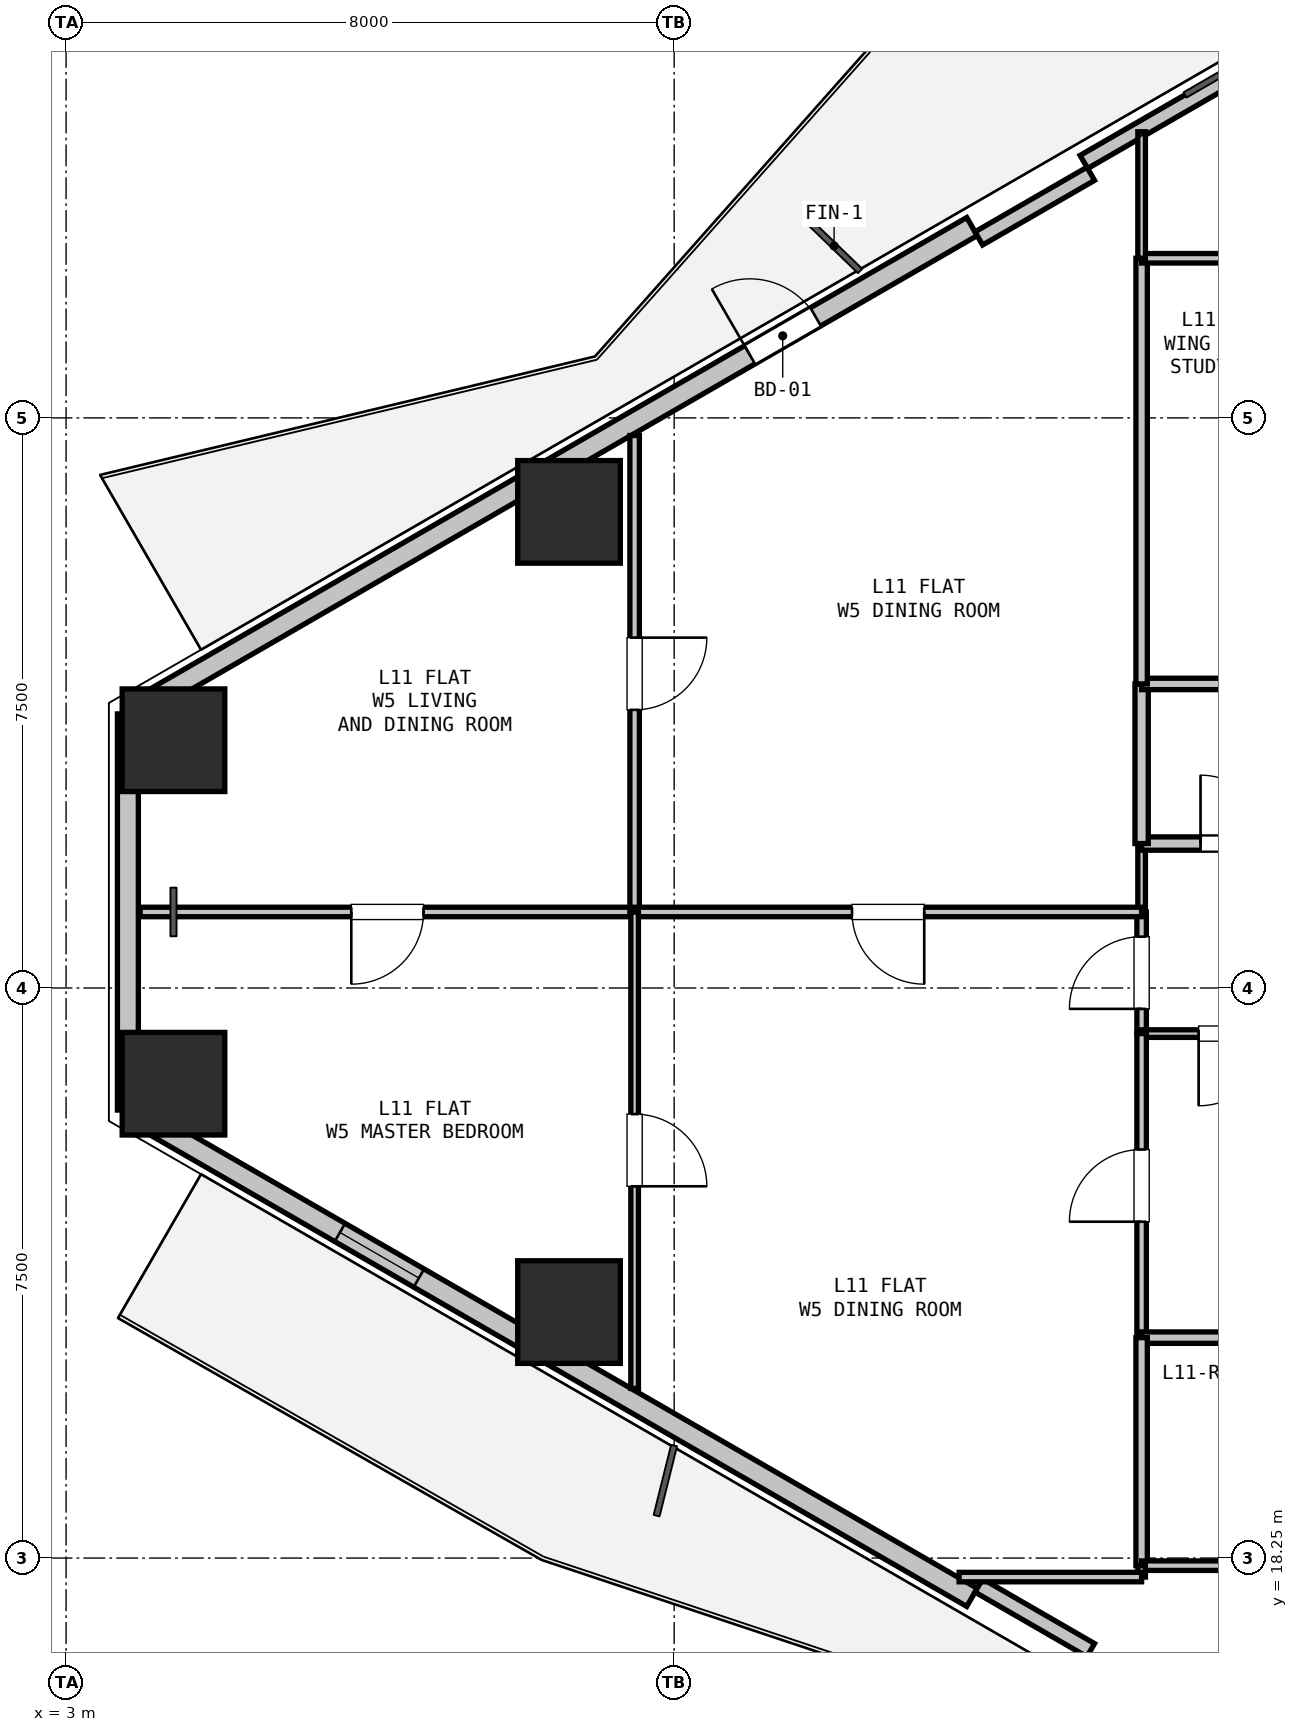
"""IFC4 building model, lengths in metres.
Left out: names, types, materials, properties, quantities, classifications, styles, units other than length and angle.
Written with IfcOpenShell. Run it as: python <this file> out.ifc"""

import sys

from ifc_helpers import new_model, si_unit, direction, frame, frame_2d, origin, origin_2d, place, context, subcontext, project, spatial, rectangle, hollow_rectangle, extrude, element, fill, save


model = new_model("IFC4")
c1 = context("Model", 3, precision=1e-05, world=origin(), true_north=direction((0.0, 1.0)))
c2 = subcontext(c1, "Body", "Model", "MODEL_VIEW")
j1 = project(units=[si_unit("LENGTHUNIT", "METRE"), si_unit("PLANEANGLEUNIT", "RADIAN")], contexts=[c1])
p1 = place(None, origin())
s1 = spatial("IfcSite", under=j1, at=p1, CompositionType="ELEMENT")
p2 = place(p1, origin())
s2 = spatial("IfcBuilding", under=s1, at=p2, CompositionType="ELEMENT")
p3 = place(p2, frame((0.0, 0.0, 42.3)))
s3 = spatial("IfcBuildingStorey", under=s2, at=p3, CompositionType="ELEMENT", Elevation=42.3)
for number, where, z_axis, x_axis in (
    (1, (4.413, 29.009, 0.0), (0.0, 0.0, 1.0), (1.0, 0.0, 0.0)),
    (2, (9.617, 32.014, 0.0), (0.0, 0.0, 1.0), (1.0, 0.0, 0.0)),
    (3, (9.617, 21.486, 0.0), (0.0, 0.0, 1.0), (1.0, 0.0, 0.0)),
    (4, (4.413, 24.491, 0.0), (0.0, 0.0, 1.0), (1.0, 0.0, 0.0)),
):
    element("IfcColumn", number, at=place(p3, frame(where, z_axis=z_axis, x_axis=x_axis)), inside=s3, PredefinedType="COLUMN", context=c2, shape_type="SweptSolid", body=[
        extrude(hollow_rectangle(XDim=1.35, YDim=1.35, WallThickness=0.036, at=origin_2d()), origin(), (0.0, 0.0, 1.0), 3.3),
    ])
p4 = place(p3, frame((3.813, 24.144, 0.0), z_axis=(0.0, 0.0, 1.0), x_axis=(0.0, 1.0, 0.0)))
e5 = element("IfcWall", 5, at=p4, inside=s3, PredefinedType="SOLIDWALL", context=c2, shape_type="SweptSolid", body=[
    extrude(rectangle(XDim=5.211, YDim=0.275, at=frame_2d((2.606, 0.0))), origin(), (0.0, 0.0, 1.0), 2.66),
])
p5 = place(p3, frame((3.943, 29.431, 0.0), z_axis=(0.0, 0.0, 1.0), x_axis=(0.866027105532, 0.499997052475, 0.0)))
e6 = element("IfcWall", 6, at=p5, inside=s3, PredefinedType="SOLIDWALL", context=c2, shape_type="SweptSolid", body=[
    extrude(rectangle(XDim=12.673, YDim=0.275, at=frame_2d((6.336, 0.0))), origin(), (0.0, 0.0, 1.0), 2.66),
])
p6 = place(p5, frame((9.298, 0.0, 0.0)))
e7 = element("IfcOpeningElement", 7, at=p6, cuts=e6, PredefinedType="OPENING", context=c2, shape_type="SweptSolid", body=[
    extrude(rectangle(XDim=1.0, YDim=2.1, at=frame_2d((0.5, 1.05))), frame((0.0, 0.147, 0.0), z_axis=(0.0, -1.0, 0.0), x_axis=(1.0, 0.0, 0.0)), (0.0, 0.0, 1.0), 0.295),
])
p7 = place(p3, frame((16.39, 36.617, 0.0), z_axis=(0.0, 0.0, 1.0), x_axis=(0.866027351828, 0.499996625875, 0.0)))
e8 = element("IfcWall", 8, at=p7, inside=s3, PredefinedType="PARAPET", context=c2, shape_type="SweptSolid", body=[
    extrude(rectangle(XDim=11.973, YDim=0.2, at=frame_2d((5.987, 0.0))), origin(), (0.0, 0.0, 1.0), 0.2),
])
p8 = place(p3, frame((15.008, 35.611, 0.0), z_axis=(0.0, 0.0, 1.0), x_axis=(0.86605165483, 0.499954529098, 0.0)))
e9 = element("IfcWall", 9, at=p8, inside=s3, PredefinedType="PARAPET", context=c2, shape_type="SweptSolid", body=[
    extrude(rectangle(XDim=1.7, YDim=0.2, at=frame_2d((0.85, 0.0))), origin(), (0.0, 0.0, 1.0), 2.66),
])
p9 = place(p3, frame((14.918, 17.733, 0.0), z_axis=(0.0, 0.0, 1.0), x_axis=(-0.866027105532, 0.499997052475, 0.0)))
e10 = element("IfcWall", 10, at=p9, inside=s3, PredefinedType="SOLIDWALL", context=c2, shape_type="SweptSolid", body=[
    extrude(rectangle(XDim=12.673, YDim=0.275, at=frame_2d((6.336, 0.0))), origin(), (0.0, 0.0, 1.0), 2.66),
])
p10 = place(p9, frame((8.402, 0.0, 0.9)))
e11 = element("IfcOpeningElement", 11, at=p10, cuts=e10, PredefinedType="OPENING", context=c2, shape_type="SweptSolid", body=[
    extrude(rectangle(XDim=1.2, YDim=1.4, at=frame_2d((0.6, 0.7))), frame((0.0, 0.147, 0.0), z_axis=(0.0, -1.0, 0.0), x_axis=(1.0, 0.0, 0.0)), (0.0, 0.0, 1.0), 0.295),
])
p11 = place(p3, frame((16.48, 17.039, 0.0), z_axis=(0.0, 0.0, 1.0), x_axis=(-0.86605165483, 0.499954529098, 0.0)))
e12 = element("IfcWall", 12, at=p11, inside=s3, PredefinedType="PARAPET", context=c2, shape_type="SweptSolid", body=[
    extrude(rectangle(XDim=1.7, YDim=0.2, at=frame_2d((0.85, 0.0))), origin(), (0.0, 0.0, 1.0), 2.66),
])
p12 = place(p3, frame((17.15, 25.15, 0.0), z_axis=(0.0, 0.0, 1.0), x_axis=(0.0, 1.0, 0.0)))
e13 = element("IfcWall", 13, at=p12, inside=s3, PredefinedType="PARTITIONING", context=c2, shape_type="SweptSolid", body=[
    extrude(rectangle(XDim=1.6, YDim=0.125, at=frame_2d((0.8, 0.0))), origin(), (0.0, 0.0, 1.0), 3.04),
])
p13 = place(p12, frame((0.325, 0.0, 0.0)))
e14 = element("IfcOpeningElement", 14, at=p13, cuts=e13, PredefinedType="OPENING", context=c2, shape_type="SweptSolid", body=[
    extrude(rectangle(XDim=0.95, YDim=2.1, at=frame_2d((0.475, 1.05))), frame((0.0, 0.073, 0.0), z_axis=(0.0, -1.0, 0.0), x_axis=(1.0, 0.0, 0.0)), (0.0, 0.0, 1.0), 0.145),
])
p14 = place(p3, frame((17.15, 26.75, 0.0), z_axis=(0.0, 0.0, 1.0), x_axis=(0.0, 1.0, 0.0)))
e15 = element("IfcWall", 15, at=p14, inside=s3, PredefinedType="PARTITIONING", context=c2, shape_type="SweptSolid", body=[
    extrude(rectangle(XDim=0.9, YDim=0.1, at=frame_2d((0.45, 0.0))), origin(), (0.0, 0.0, 1.0), 3.04),
])
p15 = place(p3, frame((17.15, 27.65, 0.0), z_axis=(0.0, 0.0, 1.0), x_axis=(1.0, 0.0, 0.0)))
e16 = element("IfcWall", 16, at=p15, inside=s3, PredefinedType="PLUMBINGWALL", context=c2, shape_type="SweptSolid", body=[
    extrude(rectangle(XDim=2.45, YDim=0.175, at=frame_2d((1.225, 0.0))), origin(), (0.0, 0.0, 1.0), 3.04),
])
p16 = place(p15, frame((0.775, 0.0, 0.0)))
e17 = element("IfcOpeningElement", 17, at=p16, cuts=e16, PredefinedType="OPENING", context=c2, shape_type="SweptSolid", body=[
    extrude(rectangle(XDim=0.9, YDim=2.1, at=frame_2d((0.45, 1.05))), frame((0.0, 0.097, 0.0), z_axis=(0.0, -1.0, 0.0), x_axis=(1.0, 0.0, 0.0)), (0.0, 0.0, 1.0), 0.195),
])
p17 = place(p3, frame((19.6, 25.15, 0.0), z_axis=(0.0, 0.0, 1.0), x_axis=(-1.0, 0.0, 0.0)))
e18 = element("IfcWall", 18, at=p17, inside=s3, PredefinedType="PARTITIONING", context=c2, shape_type="SweptSolid", body=[
    extrude(rectangle(XDim=2.45, YDim=0.1, at=frame_2d((1.225, 0.0))), origin(), (0.0, 0.0, 1.0), 3.04),
])
p18 = place(p17, frame((0.75, 0.0, 0.0)))
e19 = element("IfcOpeningElement", 19, at=p18, cuts=e18, PredefinedType="OPENING", context=c2, shape_type="SweptSolid", body=[
    extrude(rectangle(XDim=0.95, YDim=2.1, at=frame_2d((0.475, 1.05))), frame((0.0, 0.06, 0.0), z_axis=(0.0, -1.0, 0.0), x_axis=(1.0, 0.0, 0.0)), (0.0, 0.0, 1.0), 0.12),
])
p19 = place(p3, frame((17.15, 27.65, 0.0), z_axis=(0.0, 0.0, 1.0), x_axis=(0.0, 1.0, 0.0)))
e20 = element("IfcWall", 20, at=p19, inside=s3, PredefinedType="PLUMBINGWALL", context=c2, shape_type="SweptSolid", body=[
    extrude(rectangle(XDim=2.1, YDim=0.175, at=frame_2d((1.05, 0.0))), origin(), (0.0, 0.0, 1.0), 3.04),
])
p20 = place(p3, frame((17.15, 29.75, 0.0), z_axis=(0.0, 0.0, 1.0), x_axis=(1.0, 0.0, 0.0)))
e21 = element("IfcWall", 21, at=p20, inside=s3, PredefinedType="PARTITIONING", context=c2, shape_type="SweptSolid", body=[
    extrude(rectangle(XDim=2.45, YDim=0.15, at=frame_2d((1.225, 0.0))), origin(), (0.0, 0.0, 1.0), 3.04),
])
p21 = place(p3, frame((17.15, 21.15, 0.0), z_axis=(0.0, 0.0, 1.0), x_axis=(0.0, 1.0, 0.0)))
e22 = element("IfcWall", 22, at=p21, inside=s3, PredefinedType="PARTITIONING", context=c2, shape_type="SweptSolid", body=[
    extrude(rectangle(XDim=4.0, YDim=0.125, at=frame_2d((2.0, 0.0))), origin(), (0.0, 0.0, 1.0), 2.337),
])
p22 = place(p21, frame((1.525, 0.0, 0.0)))
e23 = element("IfcOpeningElement", 23, at=p22, cuts=e22, PredefinedType="OPENING", context=c2, shape_type="SweptSolid", body=[
    extrude(rectangle(XDim=0.95, YDim=2.1, at=frame_2d((0.475, 1.05))), frame((0.0, 0.073, 0.0), z_axis=(0.0, -1.0, 0.0), x_axis=(1.0, 0.0, 0.0)), (0.0, 0.0, 1.0), 0.145),
])
p23 = place(p3, frame((19.6, 21.15, 0.0), z_axis=(0.0, 0.0, 1.0), x_axis=(-1.0, 0.0, 0.0)))
e24 = element("IfcWall", 24, at=p23, inside=s3, PredefinedType="PARTITIONING", context=c2, shape_type="SweptSolid", body=[
    extrude(rectangle(XDim=2.45, YDim=0.15, at=frame_2d((1.225, 0.0))), origin(), (0.0, 0.0, 1.0), 2.337),
])
p24 = place(p3, frame((17.15, 29.75, 0.0), z_axis=(0.0, 0.0, 1.0), x_axis=(0.0, 1.0, 0.0)))
e25 = element("IfcWall", 25, at=p24, inside=s3, PredefinedType="PARTITIONING", context=c2, shape_type="SweptSolid", body=[
    extrude(rectangle(XDim=5.6, YDim=0.15, at=frame_2d((2.8, 0.0))), origin(), (0.0, 0.0, 1.0), 2.337),
])
p25 = place(p3, frame((17.15, 35.35, 0.0), z_axis=(0.0, 0.0, 1.0), x_axis=(1.0, 0.0, 0.0)))
e26 = element("IfcWall", 26, at=p25, inside=s3, PredefinedType="PARTITIONING", context=c2, shape_type="SweptSolid", body=[
    extrude(rectangle(XDim=2.45, YDim=0.125, at=frame_2d((1.225, 0.0))), origin(), (0.0, 0.0, 1.0), 3.04),
])
p26 = place(p3, frame((17.15, 18.15, 0.0), z_axis=(0.0, 0.0, 1.0), x_axis=(0.0, 1.0, 0.0)))
e27 = element("IfcWall", 27, at=p26, inside=s3, PredefinedType="PARTITIONING", context=c2, shape_type="SweptSolid", body=[
    extrude(rectangle(XDim=3.0, YDim=0.15, at=frame_2d((1.5, 0.0))), origin(), (0.0, 0.0, 1.0), 3.04),
])
p27 = place(p3, frame((19.6, 18.15, 0.0), z_axis=(0.0, 0.0, 1.0), x_axis=(-1.0, 0.0, 0.0)))
e28 = element("IfcWall", 28, at=p27, inside=s3, PredefinedType="PARTITIONING", context=c2, shape_type="SweptSolid", body=[
    extrude(rectangle(XDim=2.45, YDim=0.125, at=frame_2d((1.225, 0.0))), origin(), (0.0, 0.0, 1.0), 3.04),
])
p28 = place(p3, frame((10.48, 26.75, 0.0), z_axis=(0.0, 0.0, 1.0), x_axis=(-1.0, 0.0, 0.0)))
e29 = element("IfcWall", 29, at=p28, inside=s3, PredefinedType="PARTITIONING", context=c2, shape_type="SweptSolid", body=[
    extrude(rectangle(XDim=6.505, YDim=0.125, at=frame_2d((3.253, 0.0))), origin(), (0.0, 0.0, 1.0), 2.65),
])
p29 = place(p28, frame((2.778, 0.0, 0.0)))
e30 = element("IfcOpeningElement", 30, at=p29, cuts=e29, PredefinedType="OPENING", context=c2, shape_type="SweptSolid", body=[
    extrude(rectangle(XDim=0.95, YDim=2.1, at=frame_2d((0.475, 1.05))), frame((0.0, 0.073, 0.0), z_axis=(0.0, -1.0, 0.0), x_axis=(1.0, 0.0, 0.0)), (0.0, 0.0, 1.0), 0.145),
])
p30 = place(p3, frame((3.813, 29.356, 0.0), z_axis=(0.0, 0.0, 1.0), x_axis=(0.866131372301, 0.499816412211, 0.0)))
e31 = element("IfcWall", 31, at=p30, inside=s3, PredefinedType="PARTITIONING", context=c2, shape_type="SweptSolid", body=[
    extrude(rectangle(XDim=0.15, YDim=0.1, at=frame_2d((0.075, 0.0))), origin(), (0.0, 0.0, 1.0), 3.04),
])
p31 = place(p3, frame((10.48, 33.018, 0.0), z_axis=(0.0, 0.0, 1.0), x_axis=(0.0, -1.0, 0.0)))
e32 = element("IfcWall", 32, at=p31, inside=s3, PredefinedType="PARTITIONING", context=c2, shape_type="SweptSolid", body=[
    extrude(rectangle(XDim=6.268, YDim=0.125, at=frame_2d((3.134, 0.0))), origin(), (0.0, 0.0, 1.0), 2.337),
])
p32 = place(p31, frame((2.659, 0.0, 0.0)))
e33 = element("IfcOpeningElement", 33, at=p32, cuts=e32, PredefinedType="OPENING", context=c2, shape_type="SweptSolid", body=[
    extrude(rectangle(XDim=0.95, YDim=2.1, at=frame_2d((0.475, 1.05))), frame((0.0, 0.073, 0.0), z_axis=(0.0, -1.0, 0.0), x_axis=(1.0, 0.0, 0.0)), (0.0, 0.0, 1.0), 0.145),
])
p33 = place(p3, frame((17.15, 37.014, 0.0), z_axis=(0.0, 0.0, 1.0), x_axis=(0.0, -1.0, 0.0)))
e34 = element("IfcWall", 34, at=p33, inside=s3, PredefinedType="PARTITIONING", context=c2, shape_type="SweptSolid", body=[
    extrude(rectangle(XDim=1.664, YDim=0.1, at=frame_2d((0.832, 0.0))), origin(), (0.0, 0.0, 1.0), 2.365),
])
p34 = place(p3, frame((17.15, 26.75, 0.0), z_axis=(0.0, 0.0, 1.0), x_axis=(-1.0, 0.0, 0.0)))
e35 = element("IfcWall", 35, at=p34, inside=s3, PredefinedType="PARTITIONING", context=c2, shape_type="SweptSolid", body=[
    extrude(rectangle(XDim=6.67, YDim=0.125, at=frame_2d((3.335, 0.0))), origin(), (0.0, 0.0, 1.0), 3.04),
])
p35 = place(p34, frame((2.86, 0.0, 0.0)))
e36 = element("IfcOpeningElement", 36, at=p35, cuts=e35, PredefinedType="OPENING", context=c2, shape_type="SweptSolid", body=[
    extrude(rectangle(XDim=0.95, YDim=2.1, at=frame_2d((0.475, 1.05))), frame((0.0, 0.073, 0.0), z_axis=(0.0, -1.0, 0.0), x_axis=(1.0, 0.0, 0.0)), (0.0, 0.0, 1.0), 0.145),
])
p36 = place(p3, frame((10.48, 26.75, 0.0), z_axis=(0.0, 0.0, 1.0), x_axis=(0.0, -1.0, 0.0)))
e37 = element("IfcWall", 37, at=p36, inside=s3, PredefinedType="PARTITIONING", context=c2, shape_type="SweptSolid", body=[
    extrude(rectangle(XDim=6.268, YDim=0.1, at=frame_2d((3.134, 0.0))), origin(), (0.0, 0.0, 1.0), 2.337),
])
p37 = place(p36, frame((2.659, 0.0, 0.0)))
e38 = element("IfcOpeningElement", 38, at=p37, cuts=e37, PredefinedType="OPENING", context=c2, shape_type="SweptSolid", body=[
    extrude(rectangle(XDim=0.95, YDim=2.1, at=frame_2d((0.475, 1.05))), frame((0.0, 0.06, 0.0), z_axis=(0.0, -1.0, 0.0), x_axis=(1.0, 0.0, 0.0)), (0.0, 0.0, 1.0), 0.12),
])
p38 = place(p3, frame((3.943, 24.069, 0.0), z_axis=(0.0, 0.0, 1.0), x_axis=(-0.866131372301, 0.499816412211, 0.0)))
e39 = element("IfcWall", 39, at=p38, inside=s3, PredefinedType="PARTITIONING", context=c2, shape_type="SweptSolid", body=[
    extrude(rectangle(XDim=0.15, YDim=0.125, at=frame_2d((0.075, 0.0))), origin(), (0.0, 0.0, 1.0), 3.04),
])
p39 = place(p3, frame((17.15, 18.15, 0.0), z_axis=(0.0, 0.0, 1.0), x_axis=(0.0, -1.0, 0.0)))
e40 = element("IfcWall", 40, at=p39, inside=s3, PredefinedType="PARTITIONING", context=c2, shape_type="SweptSolid", body=[
    extrude(rectangle(XDim=0.15, YDim=0.1, at=frame_2d((0.075, 0.0))), origin(), (0.0, 0.0, 1.0), 3.04),
])
p40 = place(p3, frame((17.15, 18.0, 0.0), z_axis=(0.0, 0.0, 1.0), x_axis=(-1.0, 0.0, 0.0)))
e41 = element("IfcWall", 41, at=p40, inside=s3, PredefinedType="PARTITIONING", context=c2, shape_type="SweptSolid", body=[
    extrude(rectangle(XDim=2.401, YDim=0.125, at=frame_2d((1.2, 0.0))), origin(), (0.0, 0.0, 1.0), 2.365),
])
p41 = place(p6, origin())
e42 = element("IfcDoor", 42, at=p41, inside=s3, OperationType="SINGLE_SWING_LEFT", PredefinedType="DOOR", context=c2, shape_type="SweptSolid", body=[
    extrude(rectangle(XDim=1.0, YDim=2.1, at=frame_2d((0.5, 1.05))), frame((0.0, 0.025, 0.0), z_axis=(0.0, -1.0, 0.0), x_axis=(1.0, 0.0, 0.0)), (0.0, 0.0, 1.0), 0.05),
])
fill(e7, e42)
p42 = place(p10, origin())
e43 = element("IfcWindow", 43, at=p42, inside=s3, PartitioningType="SINGLE_PANEL", PredefinedType="WINDOW", context=c2, shape_type="SweptSolid", body=[
    extrude(rectangle(XDim=1.2, YDim=1.4, at=frame_2d((0.6, 0.7))), frame((0.0, 0.03, 0.0), z_axis=(0.0, -1.0, 0.0), x_axis=(1.0, 0.0, 0.0)), (0.0, 0.0, 1.0), 0.06),
])
fill(e11, e43)
p43 = place(p16, origin())
e44 = element("IfcDoor", 44, at=p43, inside=s3, OperationType="SINGLE_SWING_LEFT", PredefinedType="DOOR", context=c2, shape_type="SweptSolid", body=[
    extrude(rectangle(XDim=0.9, YDim=2.1, at=frame_2d((0.45, 1.05))), frame((0.0, 0.025, 0.0), z_axis=(0.0, -1.0, 0.0), x_axis=(1.0, 0.0, 0.0)), (0.0, 0.0, 1.0), 0.05),
])
fill(e17, e44)
p44 = place(p18, origin())
e45 = element("IfcDoor", 45, at=p44, inside=s3, OperationType="SINGLE_SWING_RIGHT", PredefinedType="DOOR", context=c2, shape_type="SweptSolid", body=[
    extrude(rectangle(XDim=0.95, YDim=2.1, at=frame_2d((0.475, 1.05))), frame((0.0, 0.025, 0.0), z_axis=(0.0, -1.0, 0.0), x_axis=(1.0, 0.0, 0.0)), (0.0, 0.0, 1.0), 0.05),
])
fill(e19, e45)
p45 = place(p13, origin())
e46 = element("IfcDoor", 46, at=p45, inside=s3, OperationType="SINGLE_SWING_LEFT", PredefinedType="DOOR", context=c2, shape_type="SweptSolid", body=[
    extrude(rectangle(XDim=0.95, YDim=2.1, at=frame_2d((0.475, 1.05))), frame((0.0, 0.025, 0.0), z_axis=(0.0, -1.0, 0.0), x_axis=(1.0, 0.0, 0.0)), (0.0, 0.0, 1.0), 0.05),
])
fill(e14, e46)
p46 = place(p22, origin())
e47 = element("IfcDoor", 47, at=p46, inside=s3, OperationType="SINGLE_SWING_LEFT", PredefinedType="DOOR", context=c2, shape_type="SweptSolid", body=[
    extrude(rectangle(XDim=0.95, YDim=2.1, at=frame_2d((0.475, 1.05))), frame((0.0, 0.025, 0.0), z_axis=(0.0, -1.0, 0.0), x_axis=(1.0, 0.0, 0.0)), (0.0, 0.0, 1.0), 0.05),
])
fill(e23, e47)
p47 = place(p32, origin())
e48 = element("IfcDoor", 48, at=p47, inside=s3, OperationType="SINGLE_SWING_LEFT", PredefinedType="DOOR", context=c2, shape_type="SweptSolid", body=[
    extrude(rectangle(XDim=0.95, YDim=2.1, at=frame_2d((0.475, 1.05))), frame((0.0, 0.025, 0.0), z_axis=(0.0, -1.0, 0.0), x_axis=(1.0, 0.0, 0.0)), (0.0, 0.0, 1.0), 0.05),
])
fill(e33, e48)
p48 = place(p29, origin())
e49 = element("IfcDoor", 49, at=p48, inside=s3, OperationType="SINGLE_SWING_RIGHT", PredefinedType="DOOR", context=c2, shape_type="SweptSolid", body=[
    extrude(rectangle(XDim=0.95, YDim=2.1, at=frame_2d((0.475, 1.05))), frame((0.0, 0.025, 0.0), z_axis=(0.0, -1.0, 0.0), x_axis=(1.0, 0.0, 0.0)), (0.0, 0.0, 1.0), 0.05),
])
fill(e30, e49)
p49 = place(p35, origin())
e50 = element("IfcDoor", 50, at=p49, inside=s3, OperationType="SINGLE_SWING_LEFT", PredefinedType="DOOR", context=c2, shape_type="SweptSolid", body=[
    extrude(rectangle(XDim=0.95, YDim=2.1, at=frame_2d((0.475, 1.05))), frame((0.0, 0.025, 0.0), z_axis=(0.0, -1.0, 0.0), x_axis=(1.0, 0.0, 0.0)), (0.0, 0.0, 1.0), 0.05),
])
fill(e36, e50)
p50 = place(p37, origin())
e51 = element("IfcDoor", 51, at=p50, inside=s3, OperationType="SINGLE_SWING_RIGHT", PredefinedType="DOOR", context=c2, shape_type="SweptSolid", body=[
    extrude(rectangle(XDim=0.95, YDim=2.1, at=frame_2d((0.475, 1.05))), frame((0.0, 0.025, 0.0), z_axis=(0.0, -1.0, 0.0), x_axis=(1.0, 0.0, 0.0)), (0.0, 0.0, 1.0), 0.05),
])
fill(e38, e51)
save(model, sys.argv[1])
